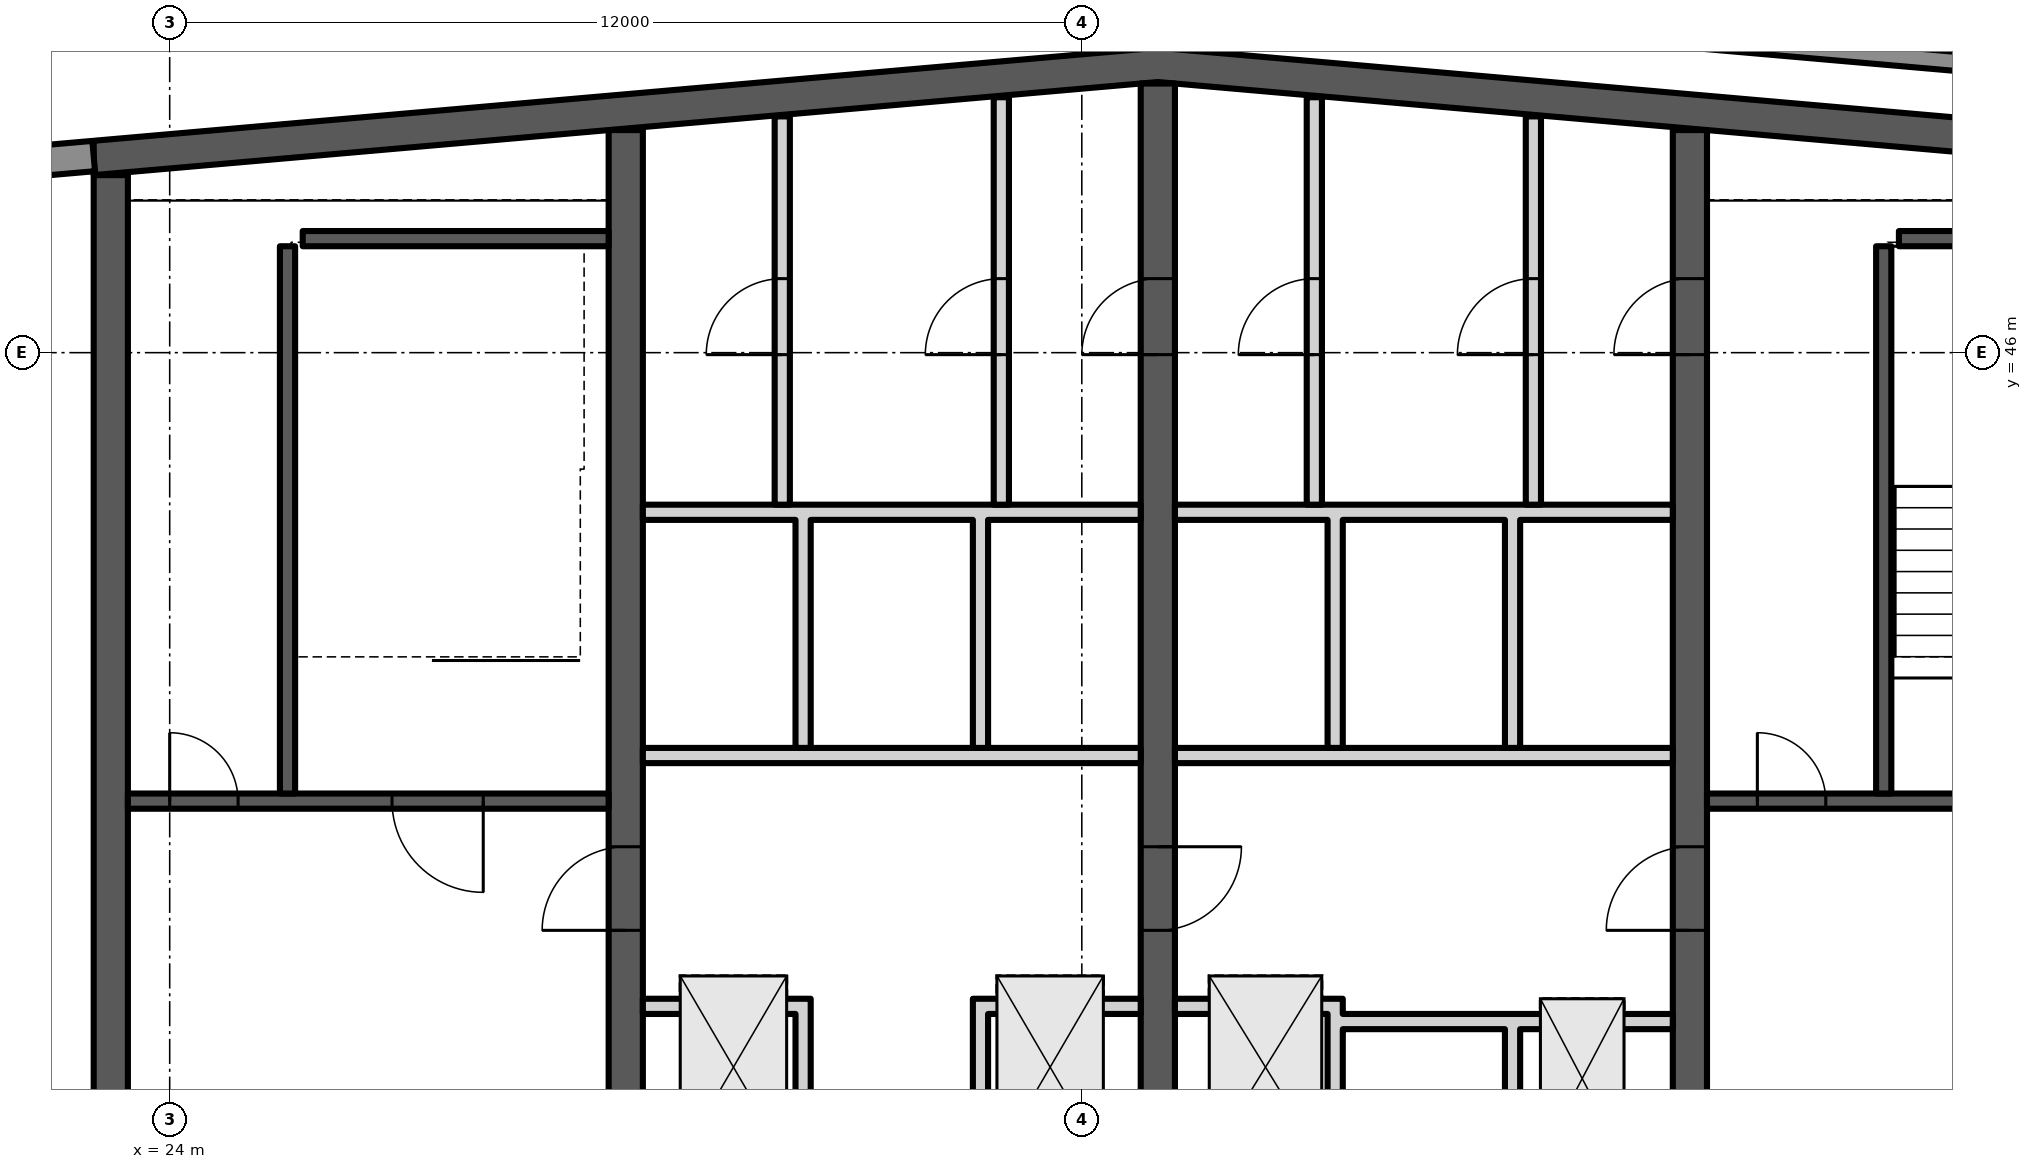
"""IFC4 building model, lengths in metres.
Left out: names, types, materials, properties, quantities, classifications, styles, units other than length and angle.
Written with IfcOpenShell. Run it as: python <this file> out.ifc"""

import sys

from ifc_helpers import new_model, si_unit, direction, frame, frame_2d, origin, place, context, subcontext, project, spatial, polyline, rectangle, outline, extrude, element, fill, save


model = new_model("IFC4")
c1 = context("Model", 3, precision=1e-05, world=origin(), true_north=direction((0.0, 1.0)))
c2 = subcontext(c1, "Body", "Model", "MODEL_VIEW")
j1 = project(units=[si_unit("LENGTHUNIT", "METRE"), si_unit("PLANEANGLEUNIT", "RADIAN")], contexts=[c1])
p1 = place(None, origin())
s1 = spatial("IfcSite", under=j1, at=p1, CompositionType="ELEMENT")
p2 = place(p1, origin())
s2 = spatial("IfcBuilding", under=s1, at=p2, CompositionType="ELEMENT")
p3 = place(p2, frame((0.0, 0.0, 261.1)))
s3 = spatial("IfcBuildingStorey", under=s2, at=p3, CompositionType="ELEMENT", Elevation=261.1)
p4 = place(p3, frame((0.0, 0.0, -0.0)))
e1 = element("IfcWall", 1, at=p4, inside=s3, PredefinedType="SHEAR", context=c2, shape_type="SweptSolid", body=[
    extrude(outline(polyline([(23.0, 48.336), (37.0, 49.561), (58.0, 47.723), (58.0, 48.175), (37.0, 50.012), (23.0, 48.787), (23.0, 48.336)])), origin(), (0.0, 0.0, 1.0), 2.366),
])
p5 = place(p3, frame((23.225, 34.45, 0.0), z_axis=(0.0, 0.0, 1.0), x_axis=(0.0, 1.0, 0.0)))
e2 = element("IfcWall", 2, at=p5, inside=s3, PredefinedType="SHEAR", context=c2, shape_type="SweptSolid", body=[
    extrude(rectangle(XDim=13.886, YDim=0.45, at=frame_2d((6.943, 0.0))), origin(), (0.0, 0.0, 1.0), 2.456),
])
p6 = place(p3, frame((30.0, 34.45, 0.0), z_axis=(0.0, 0.0, 1.0), x_axis=(0.0, 1.0, 0.0)))
e3 = element("IfcWall", 3, at=p6, inside=s3, PredefinedType="SHEAR", context=c2, shape_type="SweptSolid", body=[
    extrude(rectangle(XDim=14.479, YDim=0.45, at=frame_2d((7.239, 0.0))), origin(), (0.0, 0.0, 1.0), 3.2),
])
p7 = place(p6, frame((3.95, 0.0, 0.0)))
e4 = element("IfcOpeningElement", 4, at=p7, cuts=e3, PredefinedType="OPENING", context=c2, shape_type="SweptSolid", body=[
    extrude(rectangle(XDim=1.1, YDim=2.1, at=frame_2d((0.55, 1.05))), frame((0.0, 0.235, 0.0), z_axis=(0.0, -1.0, 0.0), x_axis=(1.0, 0.0, 0.0)), (0.0, 0.0, 1.0), 0.47),
])
p8 = place(p3, frame((37.0, 34.45, 0.0), z_axis=(0.0, 0.0, 1.0), x_axis=(0.0, 1.0, 0.0)))
e5 = element("IfcWall", 5, at=p8, inside=s3, PredefinedType="SHEAR", context=c2, shape_type="SweptSolid", body=[
    extrude(rectangle(XDim=15.091, YDim=0.45, at=frame_2d((7.545, 0.0))), origin(), (0.0, 0.0, 1.0), 3.2),
])
p9 = place(p8, frame((11.524, 0.0, 0.0)))
e6 = element("IfcOpeningElement", 6, at=p9, cuts=e5, PredefinedType="OPENING", context=c2, shape_type="SweptSolid", body=[
    extrude(rectangle(XDim=1.0, YDim=2.1, at=frame_2d((0.5, 1.05))), frame((0.0, 0.235, 0.0), z_axis=(0.0, -1.0, 0.0), x_axis=(1.0, 0.0, 0.0)), (0.0, 0.0, 1.0), 0.47),
])
p10 = place(p8, frame((3.95, 0.0, 0.0)))
e7 = element("IfcOpeningElement", 7, at=p10, cuts=e5, PredefinedType="OPENING", context=c2, shape_type="SweptSolid", body=[
    extrude(rectangle(XDim=1.1, YDim=2.1, at=frame_2d((0.55, 1.05))), frame((0.0, 0.235, 0.0), z_axis=(0.0, -1.0, 0.0), x_axis=(1.0, 0.0, 0.0)), (0.0, 0.0, 1.0), 0.47),
])
p11 = place(p3, frame((44.0, 34.45, 0.0), z_axis=(0.0, 0.0, 1.0), x_axis=(0.0, 1.0, 0.0)))
e8 = element("IfcWall", 8, at=p11, inside=s3, PredefinedType="SHEAR", context=c2, shape_type="SweptSolid", body=[
    extrude(rectangle(XDim=14.479, YDim=0.45, at=frame_2d((7.239, 0.0))), origin(), (0.0, 0.0, 1.0), 3.2),
])
p12 = place(p11, frame((11.524, 0.0, 0.0)))
e9 = element("IfcOpeningElement", 9, at=p12, cuts=e8, PredefinedType="OPENING", context=c2, shape_type="SweptSolid", body=[
    extrude(rectangle(XDim=1.0, YDim=2.1, at=frame_2d((0.5, 1.05))), frame((0.0, 0.235, 0.0), z_axis=(0.0, -1.0, 0.0), x_axis=(1.0, 0.0, 0.0)), (0.0, 0.0, 1.0), 0.47),
])
p13 = place(p11, frame((3.95, 0.0, 0.0)))
e10 = element("IfcOpeningElement", 10, at=p13, cuts=e8, PredefinedType="OPENING", context=c2, shape_type="SweptSolid", body=[
    extrude(rectangle(XDim=1.1, YDim=2.1, at=frame_2d((0.55, 1.05))), frame((0.0, 0.235, 0.0), z_axis=(0.0, -1.0, 0.0), x_axis=(1.0, 0.0, 0.0)), (0.0, 0.0, 1.0), 0.47),
])
p14 = place(p3, frame((40.5, 50.444, 0.0), z_axis=(0.0, 0.0, 1.0), x_axis=(0.996195, -0.087148, 0.0)))
e11 = element("IfcWall", 11, at=p14, inside=s3, PredefinedType="PARAPET", context=c2, shape_type="SweptSolid", body=[
    extrude(rectangle(XDim=20.829, YDim=0.25, at=frame_2d((10.415, 0.0))), origin(), (0.0, 0.0, 1.0), 1.1),
])
p15 = place(p3, frame((23.0, 48.587, 0.0), z_axis=(0.0, 0.0, 1.0), x_axis=(-0.996192, -0.087202, 0.0)))
e12 = element("IfcWall", 12, at=p15, inside=s3, PredefinedType="SOLIDWALL", context=c2, shape_type="SweptSolid", body=[
    extrude(rectangle(XDim=2.08, YDim=0.4, at=frame_2d((1.04, 0.0))), origin(), (0.0, 0.0, 1.0), 2.8),
])
p16 = place(p3, frame((23.45, 40.1, 0.0), z_axis=(0.0, 0.0, 1.0), x_axis=(1.0, 0.0, 0.0)))
e13 = element("IfcWall", 13, at=p16, inside=s3, PredefinedType="SHEAR", context=c2, shape_type="SweptSolid", body=[
    extrude(rectangle(XDim=6.325, YDim=0.2, at=frame_2d((3.163, 0.0))), origin(), (0.0, 0.0, 1.0), 2.8),
])
p17 = place(p16, frame((3.475, 0.0, 0.0)))
e14 = element("IfcOpeningElement", 14, at=p17, cuts=e13, PredefinedType="OPENING", context=c2, shape_type="SweptSolid", body=[
    extrude(rectangle(XDim=1.2, YDim=2.1, at=frame_2d((0.6, 1.05))), frame((0.0, 0.11, 0.0), z_axis=(0.0, -1.0, 0.0), x_axis=(1.0, 0.0, 0.0)), (0.0, 0.0, 1.0), 0.22),
])
p18 = place(p16, frame((0.55, 0.0, 0.0)))
e15 = element("IfcOpeningElement", 15, at=p18, cuts=e13, PredefinedType="OPENING", context=c2, shape_type="SweptSolid", body=[
    extrude(rectangle(XDim=0.9, YDim=2.1, at=frame_2d((0.45, 1.05))), frame((0.0, 0.11, 0.0), z_axis=(0.0, -1.0, 0.0), x_axis=(1.0, 0.0, 0.0)), (0.0, 0.0, 1.0), 0.22),
])
p19 = place(p3, frame((25.55, 40.2, 0.0), z_axis=(0.0, 0.0, 1.0), x_axis=(0.0, 1.0, 0.0)))
e16 = element("IfcWall", 16, at=p19, inside=s3, PredefinedType="SHEAR", context=c2, shape_type="SweptSolid", body=[
    extrude(rectangle(XDim=7.2, YDim=0.2, at=frame_2d((3.6, 0.0))), origin(), (0.0, 0.0, 1.0), 2.8),
])
p20 = place(p3, frame((25.75, 47.5, 0.0), z_axis=(0.0, 0.0, 1.0), x_axis=(1.0, 0.0, 0.0)))
e17 = element("IfcWall", 17, at=p20, inside=s3, PredefinedType="SHEAR", context=c2, shape_type="SweptSolid", body=[
    extrude(rectangle(XDim=4.025, YDim=0.2, at=frame_2d((2.012, 0.0))), origin(), (0.0, 0.0, 1.0), 2.8),
])
p21 = place(p3, frame((30.225, 40.7, 0.0), z_axis=(0.0, 0.0, 1.0), x_axis=(1.0, 0.0, 0.0)))
e18 = element("IfcWall", 18, at=p21, inside=s3, PredefinedType="PARTITIONING", context=c2, shape_type="SweptSolid", body=[
    extrude(rectangle(XDim=6.55, YDim=0.2, at=frame_2d((3.275, 0.0))), origin(), (0.0, 0.0, 1.0), 2.8),
])
p22 = place(p3, frame((0.0, 0.0, -0.0)))
e19 = element("IfcWall", 19, at=p22, inside=s3, PredefinedType="PARTITIONING", context=c2, shape_type="SweptSolid", body=[
    extrude(outline(polyline([(32.233, 37.3), (30.225, 37.3), (30.225, 37.5), (32.233, 37.5), (32.433, 37.5), (32.433, 34.45), (32.233, 34.45), (32.233, 37.3)])), origin(), (0.0, 0.0, 1.0), 2.8),
])
p23 = place(p3, frame((0.0, 0.0, -0.0)))
e20 = element("IfcWall", 20, at=p23, inside=s3, PredefinedType="PARTITIONING", context=c2, shape_type="SweptSolid", body=[
    extrude(outline(polyline([(34.567, 37.5), (34.767, 37.5), (36.775, 37.5), (36.775, 37.3), (34.767, 37.3), (34.767, 34.45), (34.567, 34.45), (34.567, 37.5)])), origin(), (0.0, 0.0, 1.0), 2.8),
])
p24 = place(p3, frame((0.0, 0.0, -0.0)))
e21 = element("IfcWall", 21, at=p24, inside=s3, PredefinedType="PARTITIONING", context=c2, shape_type="SweptSolid", body=[
    extrude(outline(polyline([(32.433, 40.8), (32.233, 40.8), (32.233, 43.8), (30.225, 43.8), (30.225, 44.0), (36.775, 44.0), (36.775, 43.8), (34.767, 43.8), (34.767, 40.8), (34.567, 40.8), (34.567, 43.8), (32.433, 43.8), (32.433, 40.8)])), origin(), (0.0, 0.0, 1.0), 2.8),
])
p25 = place(p3, frame((32.059, 44.0, 0.0), z_axis=(0.0, 0.0, 1.0), x_axis=(0.0, 1.0, 0.0)))
e22 = element("IfcWall", 22, at=p25, inside=s3, PredefinedType="PARTITIONING", context=c2, shape_type="SweptSolid", body=[
    extrude(rectangle(XDim=5.108, YDim=0.2, at=frame_2d((2.554, 0.0))), origin(), (0.0, 0.0, 1.0), 2.8),
])
p26 = place(p25, frame((1.974, 0.0, 0.0)))
e23 = element("IfcOpeningElement", 23, at=p26, cuts=e22, PredefinedType="OPENING", context=c2, shape_type="SweptSolid", body=[
    extrude(rectangle(XDim=1.0, YDim=2.1, at=frame_2d((0.5, 1.05))), frame((0.0, 0.11, 0.0), z_axis=(0.0, -1.0, 0.0), x_axis=(1.0, 0.0, 0.0)), (0.0, 0.0, 1.0), 0.22),
])
p27 = place(p3, frame((34.941, 44.0, 0.0), z_axis=(0.0, 0.0, 1.0), x_axis=(0.0, 1.0, 0.0)))
e24 = element("IfcWall", 24, at=p27, inside=s3, PredefinedType="PARTITIONING", context=c2, shape_type="SweptSolid", body=[
    extrude(rectangle(XDim=5.36, YDim=0.2, at=frame_2d((2.68, 0.0))), origin(), (0.0, 0.0, 1.0), 2.8),
])
p28 = place(p27, frame((1.974, 0.0, 0.0)))
e25 = element("IfcOpeningElement", 25, at=p28, cuts=e24, PredefinedType="OPENING", context=c2, shape_type="SweptSolid", body=[
    extrude(rectangle(XDim=1.0, YDim=2.1, at=frame_2d((0.5, 1.05))), frame((0.0, 0.11, 0.0), z_axis=(0.0, -1.0, 0.0), x_axis=(1.0, 0.0, 0.0)), (0.0, 0.0, 1.0), 0.22),
])
p29 = place(p3, frame((37.225, 40.7, 0.0), z_axis=(0.0, 0.0, 1.0), x_axis=(1.0, 0.0, 0.0)))
e26 = element("IfcWall", 26, at=p29, inside=s3, PredefinedType="PARTITIONING", context=c2, shape_type="SweptSolid", body=[
    extrude(rectangle(XDim=6.55, YDim=0.2, at=frame_2d((3.275, 0.0))), origin(), (0.0, 0.0, 1.0), 2.8),
])
p30 = place(p3, frame((0.0, 0.0, -0.0)))
e27 = element("IfcWall", 27, at=p30, inside=s3, PredefinedType="PARTITIONING", context=c2, shape_type="SweptSolid", body=[
    extrude(outline(polyline([(41.567, 37.1), (39.433, 37.1), (39.433, 34.45), (39.233, 34.45), (39.233, 37.3), (37.225, 37.3), (37.225, 37.5), (39.233, 37.5), (39.433, 37.5), (39.433, 37.3), (41.567, 37.3), (41.767, 37.3), (43.775, 37.3), (43.775, 37.1), (41.767, 37.1), (41.767, 34.45), (41.567, 34.45), (41.567, 37.1)])), origin(), (0.0, 0.0, 1.0), 2.8),
])
p31 = place(p3, frame((0.0, 0.0, -0.0)))
e28 = element("IfcWall", 28, at=p31, inside=s3, PredefinedType="PARTITIONING", context=c2, shape_type="SweptSolid", body=[
    extrude(outline(polyline([(39.433, 40.8), (39.233, 40.8), (39.233, 43.8), (37.225, 43.8), (37.225, 44.0), (43.775, 44.0), (43.775, 43.8), (41.767, 43.8), (41.767, 40.8), (41.567, 40.8), (41.567, 43.8), (39.433, 43.8), (39.433, 40.8)])), origin(), (0.0, 0.0, 1.0), 2.8),
])
p32 = place(p3, frame((39.059, 44.0, 0.0), z_axis=(0.0, 0.0, 1.0), x_axis=(0.0, 1.0, 0.0)))
e29 = element("IfcWall", 29, at=p32, inside=s3, PredefinedType="PARTITIONING", context=c2, shape_type="SweptSolid", body=[
    extrude(rectangle(XDim=5.36, YDim=0.2, at=frame_2d((2.68, 0.0))), origin(), (0.0, 0.0, 1.0), 2.8),
])
p33 = place(p32, frame((1.974, 0.0, 0.0)))
e30 = element("IfcOpeningElement", 30, at=p33, cuts=e29, PredefinedType="OPENING", context=c2, shape_type="SweptSolid", body=[
    extrude(rectangle(XDim=1.0, YDim=2.1, at=frame_2d((0.5, 1.05))), frame((0.0, 0.11, 0.0), z_axis=(0.0, -1.0, 0.0), x_axis=(1.0, 0.0, 0.0)), (0.0, 0.0, 1.0), 0.22),
])
p34 = place(p3, frame((41.941, 44.0, 0.0), z_axis=(0.0, 0.0, 1.0), x_axis=(0.0, 1.0, 0.0)))
e31 = element("IfcWall", 31, at=p34, inside=s3, PredefinedType="PARTITIONING", context=c2, shape_type="SweptSolid", body=[
    extrude(rectangle(XDim=5.108, YDim=0.2, at=frame_2d((2.554, 0.0))), origin(), (0.0, 0.0, 1.0), 2.8),
])
p35 = place(p34, frame((1.974, 0.0, 0.0)))
e32 = element("IfcOpeningElement", 32, at=p35, cuts=e31, PredefinedType="OPENING", context=c2, shape_type="SweptSolid", body=[
    extrude(rectangle(XDim=1.0, YDim=2.1, at=frame_2d((0.5, 1.05))), frame((0.0, 0.11, 0.0), z_axis=(0.0, -1.0, 0.0), x_axis=(1.0, 0.0, 0.0)), (0.0, 0.0, 1.0), 0.22),
])
p36 = place(p3, frame((44.225, 40.1, 0.0), z_axis=(0.0, 0.0, 1.0), x_axis=(1.0, 0.0, 0.0)))
e33 = element("IfcWall", 33, at=p36, inside=s3, PredefinedType="SHEAR", context=c2, shape_type="SweptSolid", body=[
    extrude(rectangle(XDim=6.325, YDim=0.2, at=frame_2d((3.163, 0.0))), origin(), (0.0, 0.0, 1.0), 2.8),
])
p37 = place(p36, frame((3.7, 0.0, 0.0)))
e34 = element("IfcOpeningElement", 34, at=p37, cuts=e33, PredefinedType="OPENING", context=c2, shape_type="SweptSolid", body=[
    extrude(rectangle(XDim=1.2, YDim=2.1, at=frame_2d((0.6, 1.05))), frame((0.0, 0.11, 0.0), z_axis=(0.0, -1.0, 0.0), x_axis=(1.0, 0.0, 0.0)), (0.0, 0.0, 1.0), 0.22),
])
p38 = place(p36, frame((0.663, 0.0, 0.0)))
e35 = element("IfcOpeningElement", 35, at=p38, cuts=e33, PredefinedType="OPENING", context=c2, shape_type="SweptSolid", body=[
    extrude(rectangle(XDim=0.9, YDim=2.1, at=frame_2d((0.45, 1.05))), frame((0.0, 0.11, 0.0), z_axis=(0.0, -1.0, 0.0), x_axis=(1.0, 0.0, 0.0)), (0.0, 0.0, 1.0), 0.22),
])
p39 = place(p3, frame((46.55, 40.2, 0.0), z_axis=(0.0, 0.0, 1.0), x_axis=(0.0, 1.0, 0.0)))
e36 = element("IfcWall", 36, at=p39, inside=s3, PredefinedType="SHEAR", context=c2, shape_type="SweptSolid", body=[
    extrude(rectangle(XDim=7.2, YDim=0.2, at=frame_2d((3.6, 0.0))), origin(), (0.0, 0.0, 1.0), 2.8),
])
p40 = place(p3, frame((46.75, 47.5, 0.0), z_axis=(0.0, 0.0, 1.0), x_axis=(1.0, 0.0, 0.0)))
e37 = element("IfcWall", 37, at=p40, inside=s3, PredefinedType="SHEAR", context=c2, shape_type="SweptSolid", body=[
    extrude(rectangle(XDim=4.025, YDim=0.2, at=frame_2d((2.012, 0.0))), origin(), (0.0, 0.0, 1.0), 2.8),
])
p41 = place(p17, origin())
e38 = element("IfcDoor", 38, at=p41, inside=s3, OperationType="SINGLE_SWING_RIGHT", PredefinedType="DOOR", context=c2, shape_type="SweptSolid", body=[
    extrude(rectangle(XDim=1.2, YDim=2.1, at=frame_2d((0.6, 1.05))), frame((0.0, 0.025, 0.0), z_axis=(0.0, -1.0, 0.0), x_axis=(1.0, 0.0, 0.0)), (0.0, 0.0, 1.0), 0.05),
])
fill(e14, e38)
p42 = place(p18, origin())
e39 = element("IfcDoor", 39, at=p42, inside=s3, OperationType="SINGLE_SWING_LEFT", PredefinedType="DOOR", context=c2, shape_type="SweptSolid", body=[
    extrude(rectangle(XDim=0.9, YDim=2.1, at=frame_2d((0.45, 1.05))), frame((0.0, 0.025, 0.0), z_axis=(0.0, -1.0, 0.0), x_axis=(1.0, 0.0, 0.0)), (0.0, 0.0, 1.0), 0.05),
])
fill(e15, e39)
p43 = place(p26, origin())
e40 = element("IfcDoor", 40, at=p43, inside=s3, OperationType="SINGLE_SWING_LEFT", PredefinedType="DOOR", context=c2, shape_type="SweptSolid", body=[
    extrude(rectangle(XDim=1.0, YDim=2.1, at=frame_2d((0.5, 1.05))), frame((0.0, 0.025, 0.0), z_axis=(0.0, -1.0, 0.0), x_axis=(1.0, 0.0, 0.0)), (0.0, 0.0, 1.0), 0.05),
])
fill(e23, e40)
p44 = place(p28, origin())
e41 = element("IfcDoor", 41, at=p44, inside=s3, OperationType="SINGLE_SWING_LEFT", PredefinedType="DOOR", context=c2, shape_type="SweptSolid", body=[
    extrude(rectangle(XDim=1.0, YDim=2.1, at=frame_2d((0.5, 1.05))), frame((0.0, 0.025, 0.0), z_axis=(0.0, -1.0, 0.0), x_axis=(1.0, 0.0, 0.0)), (0.0, 0.0, 1.0), 0.05),
])
fill(e25, e41)
p45 = place(p9, origin())
e42 = element("IfcDoor", 42, at=p45, inside=s3, OperationType="SINGLE_SWING_LEFT", PredefinedType="DOOR", context=c2, shape_type="SweptSolid", body=[
    extrude(rectangle(XDim=1.0, YDim=2.1, at=frame_2d((0.5, 1.05))), frame((0.0, 0.025, 0.0), z_axis=(0.0, -1.0, 0.0), x_axis=(1.0, 0.0, 0.0)), (0.0, 0.0, 1.0), 0.05),
])
fill(e6, e42)
p46 = place(p33, origin())
e43 = element("IfcDoor", 43, at=p46, inside=s3, OperationType="SINGLE_SWING_LEFT", PredefinedType="DOOR", context=c2, shape_type="SweptSolid", body=[
    extrude(rectangle(XDim=1.0, YDim=2.1, at=frame_2d((0.5, 1.05))), frame((0.0, 0.025, 0.0), z_axis=(0.0, -1.0, 0.0), x_axis=(1.0, 0.0, 0.0)), (0.0, 0.0, 1.0), 0.05),
])
fill(e30, e43)
p47 = place(p35, origin())
e44 = element("IfcDoor", 44, at=p47, inside=s3, OperationType="SINGLE_SWING_LEFT", PredefinedType="DOOR", context=c2, shape_type="SweptSolid", body=[
    extrude(rectangle(XDim=1.0, YDim=2.1, at=frame_2d((0.5, 1.05))), frame((0.0, 0.025, 0.0), z_axis=(0.0, -1.0, 0.0), x_axis=(1.0, 0.0, 0.0)), (0.0, 0.0, 1.0), 0.05),
])
fill(e32, e44)
p48 = place(p12, origin())
e45 = element("IfcDoor", 45, at=p48, inside=s3, OperationType="SINGLE_SWING_LEFT", PredefinedType="DOOR", context=c2, shape_type="SweptSolid", body=[
    extrude(rectangle(XDim=1.0, YDim=2.1, at=frame_2d((0.5, 1.05))), frame((0.0, 0.025, 0.0), z_axis=(0.0, -1.0, 0.0), x_axis=(1.0, 0.0, 0.0)), (0.0, 0.0, 1.0), 0.05),
])
fill(e9, e45)
p49 = place(p38, origin())
e46 = element("IfcDoor", 46, at=p49, inside=s3, OperationType="SINGLE_SWING_LEFT", PredefinedType="DOOR", context=c2, shape_type="SweptSolid", body=[
    extrude(rectangle(XDim=0.9, YDim=2.1, at=frame_2d((0.45, 1.05))), frame((0.0, 0.025, 0.0), z_axis=(0.0, -1.0, 0.0), x_axis=(1.0, 0.0, 0.0)), (0.0, 0.0, 1.0), 0.05),
])
fill(e35, e46)
p50 = place(p7, origin())
e47 = element("IfcDoor", 47, at=p50, inside=s3, OperationType="SINGLE_SWING_LEFT", PredefinedType="DOOR", context=c2, shape_type="SweptSolid", body=[
    extrude(rectangle(XDim=1.1, YDim=2.1, at=frame_2d((0.55, 1.05))), frame((0.0, 0.025, 0.0), z_axis=(0.0, -1.0, 0.0), x_axis=(1.0, 0.0, 0.0)), (0.0, 0.0, 1.0), 0.05),
])
fill(e4, e47)
p51 = place(p10, origin())
e48 = element("IfcDoor", 48, at=p51, inside=s3, OperationType="SINGLE_SWING_RIGHT", PredefinedType="DOOR", context=c2, shape_type="SweptSolid", body=[
    extrude(rectangle(XDim=1.1, YDim=2.1, at=frame_2d((0.55, 1.05))), frame((0.0, 0.025, 0.0), z_axis=(0.0, -1.0, 0.0), x_axis=(1.0, 0.0, 0.0)), (0.0, 0.0, 1.0), 0.05),
])
fill(e7, e48)
p52 = place(p13, origin())
e49 = element("IfcDoor", 49, at=p52, inside=s3, OperationType="SINGLE_SWING_LEFT", PredefinedType="DOOR", context=c2, shape_type="SweptSolid", body=[
    extrude(rectangle(XDim=1.1, YDim=2.1, at=frame_2d((0.55, 1.05))), frame((0.0, 0.025, 0.0), z_axis=(0.0, -1.0, 0.0), x_axis=(1.0, 0.0, 0.0)), (0.0, 0.0, 1.0), 0.05),
])
fill(e10, e49)
save(model, sys.argv[1])
